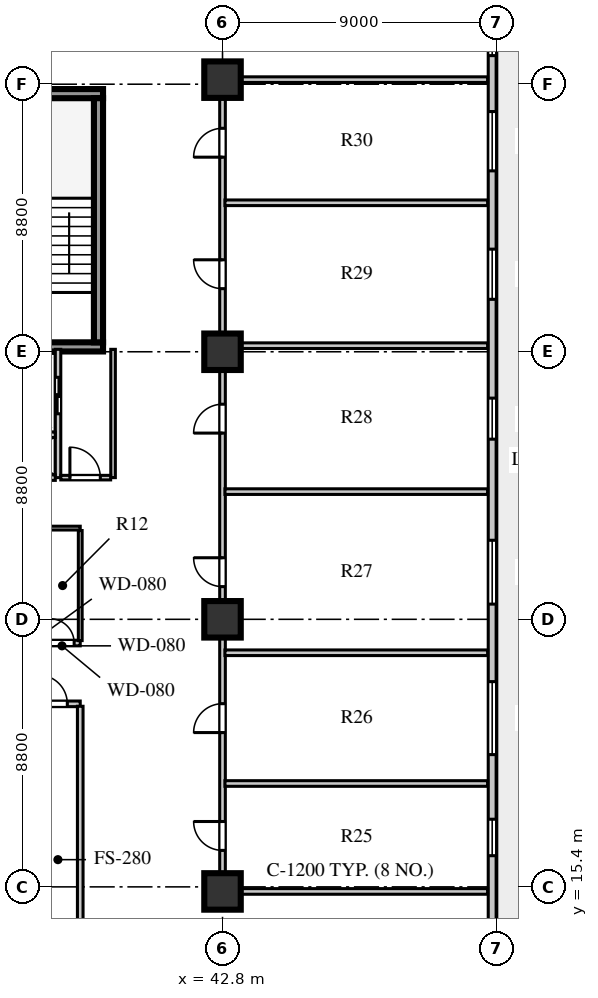
"""IFC4 building model, lengths in metres.
Left out: names, types, materials, properties, quantities, classifications, styles, units other than length and angle.
Written with IfcOpenShell. Run it as: python <this file> out.ifc"""

import sys

from ifc_helpers import new_model, si_unit, direction, frame, frame_2d, origin, origin_2d, place, context, subcontext, project, spatial, rectangle, extrude, element, fill, save


model = new_model("IFC4")
c1 = context("Model", 3, precision=1e-05, world=origin(), true_north=direction((0.0, 1.0)))
c2 = subcontext(c1, "Body", "Model", "MODEL_VIEW")
j1 = project(units=[si_unit("LENGTHUNIT", "METRE"), si_unit("PLANEANGLEUNIT", "RADIAN")], contexts=[c1])
p1 = place(None, origin())
s1 = spatial("IfcSite", under=j1, at=p1, CompositionType="ELEMENT")
p2 = place(p1, origin())
s2 = spatial("IfcBuilding", under=s1, at=p2, CompositionType="ELEMENT")
p3 = place(p2, frame((0.0, 0.0, 74.0)))
s3 = spatial("IfcBuildingStorey", under=s2, at=p3, CompositionType="ELEMENT", Elevation=74.0)
for number, where, z_axis, x_axis in (
    (1, (34.4, 33.16, 0.0), (0.0, 0.0, 1.0), (1.0, 0.0, 0.0)),
    (2, (34.4, 41.49, 0.0), (0.0, 0.0, 1.0), (1.0, 0.0, 0.0)),
):
    element("IfcWall", number, at=place(p3, frame(where, z_axis=z_axis, x_axis=x_axis)), inside=s3, PredefinedType="SHEAR", context=c2, shape_type="SweptSolid", body=[
        extrude(rectangle(XDim=4.47, YDim=0.3, at=frame_2d((2.235, 0.0))), origin(), (0.0, 0.0, 1.0), 3.72),
    ])
p4 = place(p3, frame((38.72, 33.31, 0.0), z_axis=(0.0, 0.0, 1.0), x_axis=(0.0, 1.0, 0.0)))
e3 = element("IfcWall", 3, at=p4, inside=s3, PredefinedType="SHEAR", context=c2, shape_type="SweptSolid", body=[
    extrude(rectangle(XDim=8.03, YDim=0.3, at=frame_2d((4.015, 0.0))), origin(), (0.0, 0.0, 1.0), 3.72),
])
for number, where, z_axis, x_axis in (
    (4, (42.8, 15.25, 0.0), (0.0, 0.0, 1.0), (1.0, 0.0, 0.0)),
    (5, (42.8, 24.2, 0.0), (0.0, 0.0, 1.0), (1.0, 0.0, 0.0)),
    (6, (42.8, 33.0, 0.0), (0.0, 0.0, 1.0), (1.0, 0.0, 0.0)),
    (7, (42.8, 41.95, 0.0), (0.0, 0.0, 1.0), (1.0, 0.0, 0.0)),
):
    element("IfcColumn", number, at=place(p3, frame(where, z_axis=z_axis, x_axis=x_axis)), inside=s3, PredefinedType="COLUMN", context=c2, shape_type="SweptSolid", body=[
        extrude(rectangle(XDim=1.2, YDim=1.2, at=origin_2d()), origin(), (0.0, 0.0, 1.0), 3.72),
    ])
p5 = place(p3, frame((51.67, 12.36, 0.0), z_axis=(0.0, 0.0, 1.0), x_axis=(0.0, 1.0, 0.0)))
e8 = element("IfcWall", 8, at=p5, inside=s3, PredefinedType="SOLIDWALL", context=c2, shape_type="SweptSolid", body=[
    extrude(rectangle(XDim=32.48, YDim=0.26, at=frame_2d((16.24, 0.0))), origin(), (0.0, 0.0, 1.0), 3.72),
])
p6 = place(p5, frame((0.69, 0.0, 0.0)))
e9 = element("IfcOpeningElement", 9, at=p6, cuts=e8, PredefinedType="OPENING", context=c2, shape_type="SweptSolid", body=[
    extrude(rectangle(XDim=1.0, YDim=2.05, at=frame_2d((0.5, 1.025))), frame((0.0, 0.14, 0.0), z_axis=(0.0, -1.0, 0.0), x_axis=(1.0, 0.0, 0.0)), (0.0, 0.0, 1.0), 0.28),
])
p7 = place(p5, frame((4.065, 0.0, 0.8)))
e10 = element("IfcOpeningElement", 10, at=p7, cuts=e8, PredefinedType="OPENING", context=c2, shape_type="SweptSolid", body=[
    extrude(rectangle(XDim=1.2, YDim=1.75, at=frame_2d((0.6, 0.875))), frame((0.0, 0.14, 0.0), z_axis=(0.0, -1.0, 0.0), x_axis=(1.0, 0.0, 0.0)), (0.0, 0.0, 1.0), 0.28),
])
p8 = place(p5, frame((7.39, 0.0, 0.8)))
e11 = element("IfcOpeningElement", 11, at=p8, cuts=e8, PredefinedType="OPENING", context=c2, shape_type="SweptSolid", body=[
    extrude(rectangle(XDim=2.4, YDim=2.05, at=frame_2d((1.2, 1.025))), frame((0.0, 0.14, 0.0), z_axis=(0.0, -1.0, 0.0), x_axis=(1.0, 0.0, 0.0)), (0.0, 0.0, 1.0), 0.28),
])
p9 = place(p5, frame((12.34, 0.0, 0.8)))
e12 = element("IfcOpeningElement", 12, at=p9, cuts=e8, PredefinedType="OPENING", context=c2, shape_type="SweptSolid", body=[
    extrude(rectangle(XDim=2.1, YDim=1.95, at=frame_2d((1.05, 0.975))), frame((0.0, 0.14, 0.0), z_axis=(0.0, -1.0, 0.0), x_axis=(1.0, 0.0, 0.0)), (0.0, 0.0, 1.0), 0.28),
])
p10 = place(p5, frame((17.765, 0.0, 0.8)))
e13 = element("IfcOpeningElement", 13, at=p10, cuts=e8, PredefinedType="OPENING", context=c2, shape_type="SweptSolid", body=[
    extrude(rectangle(XDim=1.35, YDim=1.9, at=frame_2d((0.675, 0.95))), frame((0.0, 0.14, 0.0), z_axis=(0.0, -1.0, 0.0), x_axis=(1.0, 0.0, 0.0)), (0.0, 0.0, 1.0), 0.28),
])
p11 = place(p5, frame((22.365, 0.0, 0.8)))
e14 = element("IfcOpeningElement", 14, at=p11, cuts=e8, PredefinedType="OPENING", context=c2, shape_type="SweptSolid", body=[
    extrude(rectangle(XDim=1.65, YDim=1.95, at=frame_2d((0.825, 0.975))), frame((0.0, 0.14, 0.0), z_axis=(0.0, -1.0, 0.0), x_axis=(1.0, 0.0, 0.0)), (0.0, 0.0, 1.0), 0.28),
])
p12 = place(p5, frame((26.59, 0.0, 0.8)))
e15 = element("IfcOpeningElement", 15, at=p12, cuts=e8, PredefinedType="OPENING", context=c2, shape_type="SweptSolid", body=[
    extrude(rectangle(XDim=1.95, YDim=2.0, at=frame_2d((0.975, 1.0))), frame((0.0, 0.14, 0.0), z_axis=(0.0, -1.0, 0.0), x_axis=(1.0, 0.0, 0.0)), (0.0, 0.0, 1.0), 0.28),
])
p13 = place(p5, frame((30.38, 0.0, 0.8)))
e16 = element("IfcOpeningElement", 16, at=p13, cuts=e8, PredefinedType="OPENING", context=c2, shape_type="SweptSolid", body=[
    extrude(rectangle(XDim=1.2, YDim=1.75, at=frame_2d((0.6, 0.875))), frame((0.0, 0.14, 0.0), z_axis=(0.0, -1.0, 0.0), x_axis=(1.0, 0.0, 0.0)), (0.0, 0.0, 1.0), 0.28),
])
p14 = place(p3, frame((37.39, 28.86, 0.0), z_axis=(0.0, 0.0, 1.0), x_axis=(0.0, 1.0, 0.0)))
e17 = element("IfcWall", 17, at=p14, inside=s3, PredefinedType="SOLIDWALL", context=c2, shape_type="SweptSolid", body=[
    extrude(rectangle(XDim=4.22, YDim=0.18, at=frame_2d((2.11, 0.0))), origin(), (0.0, 0.0, 1.0), 3.72),
])
p15 = place(p14, frame((2.1, 0.0, 0.0)))
e18 = element("IfcOpeningElement", 18, at=p15, cuts=e17, PredefinedType="OPENING", context=c2, shape_type="SweptSolid", body=[
    extrude(rectangle(XDim=1.2, YDim=2.12, at=frame_2d((0.6, 1.06))), frame((0.0, 0.1, 0.0), z_axis=(0.0, -1.0, 0.0), x_axis=(1.0, 0.0, 0.0)), (0.0, 0.0, 1.0), 0.2),
])
for number, where, z_axis, x_axis in (
    (19, (35.05, 28.86, 0.0), (0.0, 0.0, 1.0), (1.0, 0.0, 0.0)),
    (20, (35.05, 30.27, 0.0), (0.0, 0.0, 1.0), (1.0, 0.0, 0.0)),
):
    element("IfcWall", number, at=place(p3, frame(where, z_axis=z_axis, x_axis=x_axis)), inside=s3, PredefinedType="SOLIDWALL", context=c2, shape_type="SweptSolid", body=[
        extrude(rectangle(XDim=2.25, YDim=0.18, at=frame_2d((1.125, 0.0))), origin(), (0.0, 0.0, 1.0), 3.72),
    ])
p16 = place(p3, frame((39.2, 28.86, 0.0), z_axis=(0.0, 0.0, 1.0), x_axis=(0.0, 1.0, 0.0)))
e21 = element("IfcWall", 21, at=p16, inside=s3, PredefinedType="PARTITIONING", context=c2, shape_type="SweptSolid", body=[
    extrude(rectangle(XDim=4.22, YDim=0.15, at=frame_2d((2.11, 0.0))), origin(), (0.0, 0.0, 1.0), 3.72),
])
p17 = place(p3, frame((37.48, 28.86, 0.0), z_axis=(0.0, 0.0, 1.0), x_axis=(1.0, 0.0, 0.0)))
e22 = element("IfcWall", 22, at=p17, inside=s3, PredefinedType="PARTITIONING", context=c2, shape_type="SweptSolid", body=[
    extrude(rectangle(XDim=1.64, YDim=0.15, at=frame_2d((0.82, 0.0))), origin(), (0.0, 0.0, 1.0), 3.72),
])
p18 = place(p17, frame((0.3, 0.0, 0.0)))
e23 = element("IfcOpeningElement", 23, at=p18, cuts=e22, PredefinedType="OPENING", context=c2, shape_type="SweptSolid", body=[
    extrude(rectangle(XDim=1.0, YDim=2.1, at=frame_2d((0.5, 1.05))), frame((0.0, 0.085, 0.0), z_axis=(0.0, -1.0, 0.0), x_axis=(1.0, 0.0, 0.0)), (0.0, 0.0, 1.0), 0.17),
])
p19 = place(p3, frame((25.25, 21.42, 0.0), z_axis=(0.0, 0.0, 1.0), x_axis=(1.0, 0.0, 0.0)))
e24 = element("IfcWall", 24, at=p19, inside=s3, PredefinedType="SOLIDWALL", context=c2, shape_type="SweptSolid", body=[
    extrude(rectangle(XDim=12.87, YDim=0.185, at=frame_2d((6.435, 0.0))), origin(), (0.0, 0.0, 1.0), 3.32),
])
p20 = place(p19, frame((0.725, 0.0, 0.0)))
e25 = element("IfcOpeningElement", 25, at=p20, cuts=e24, PredefinedType="OPENING", context=c2, shape_type="SweptSolid", body=[
    extrude(rectangle(XDim=0.95, YDim=2.08, at=frame_2d((0.475, 1.04))), frame((0.0, 0.103, 0.0), z_axis=(0.0, -1.0, 0.0), x_axis=(1.0, 0.0, 0.0)), (0.0, 0.0, 1.0), 0.205),
])
p21 = place(p19, frame((3.025, 0.0, 0.0)))
e26 = element("IfcOpeningElement", 26, at=p21, cuts=e24, PredefinedType="OPENING", context=c2, shape_type="SweptSolid", body=[
    extrude(rectangle(XDim=0.95, YDim=2.08, at=frame_2d((0.475, 1.04))), frame((0.0, 0.103, 0.0), z_axis=(0.0, -1.0, 0.0), x_axis=(1.0, 0.0, 0.0)), (0.0, 0.0, 1.0), 0.205),
])
p22 = place(p19, frame((5.325, 0.0, 0.0)))
e27 = element("IfcOpeningElement", 27, at=p22, cuts=e24, PredefinedType="OPENING", context=c2, shape_type="SweptSolid", body=[
    extrude(rectangle(XDim=0.95, YDim=2.08, at=frame_2d((0.475, 1.04))), frame((0.0, 0.103, 0.0), z_axis=(0.0, -1.0, 0.0), x_axis=(1.0, 0.0, 0.0)), (0.0, 0.0, 1.0), 0.205),
])
p23 = place(p19, frame((7.625, 0.0, 0.0)))
e28 = element("IfcOpeningElement", 28, at=p23, cuts=e24, PredefinedType="OPENING", context=c2, shape_type="SweptSolid", body=[
    extrude(rectangle(XDim=0.95, YDim=2.08, at=frame_2d((0.475, 1.04))), frame((0.0, 0.103, 0.0), z_axis=(0.0, -1.0, 0.0), x_axis=(1.0, 0.0, 0.0)), (0.0, 0.0, 1.0), 0.205),
])
p24 = place(p19, frame((9.725, 0.0, 0.0)))
e29 = element("IfcOpeningElement", 29, at=p24, cuts=e24, PredefinedType="OPENING", context=c2, shape_type="SweptSolid", body=[
    extrude(rectangle(XDim=0.95, YDim=2.08, at=frame_2d((0.475, 1.04))), frame((0.0, 0.103, 0.0), z_axis=(0.0, -1.0, 0.0), x_axis=(1.0, 0.0, 0.0)), (0.0, 0.0, 1.0), 0.205),
])
p25 = place(p19, frame((11.495, 0.0, 0.0)))
e30 = element("IfcOpeningElement", 30, at=p25, cuts=e24, PredefinedType="OPENING", context=c2, shape_type="SweptSolid", body=[
    extrude(rectangle(XDim=0.95, YDim=2.08, at=frame_2d((0.475, 1.04))), frame((0.0, 0.103, 0.0), z_axis=(0.0, -1.0, 0.0), x_axis=(1.0, 0.0, 0.0)), (0.0, 0.0, 1.0), 0.205),
])
p26 = place(p3, frame((38.12, 6.88, 0.0), z_axis=(0.0, 0.0, 1.0), x_axis=(0.0, 1.0, 0.0)))
e31 = element("IfcWall", 31, at=p26, inside=s3, PredefinedType="SOLIDWALL", context=c2, shape_type="SweptSolid", body=[
    extrude(rectangle(XDim=14.46, YDim=0.185, at=frame_2d((7.23, 0.0))), origin(), (0.0, 0.0, 1.0), 3.72),
])
p27 = place(p3, frame((34.6, 23.42, 0.0), z_axis=(0.0, 0.0, 1.0), x_axis=(1.0, 0.0, 0.0)))
e32 = element("IfcWall", 32, at=p27, inside=s3, PredefinedType="SOLIDWALL", context=c2, shape_type="SweptSolid", body=[
    extrude(rectangle(XDim=3.52, YDim=0.185, at=frame_2d((1.76, 0.0))), origin(), (0.0, 0.0, 1.0), 3.72),
])
p28 = place(p27, frame((0.22, 0.0, 0.0)))
e33 = element("IfcOpeningElement", 33, at=p28, cuts=e32, PredefinedType="OPENING", context=c2, shape_type="SweptSolid", body=[
    extrude(rectangle(XDim=0.8, YDim=2.05, at=frame_2d((0.4, 1.025))), frame((0.0, 0.103, 0.0), z_axis=(0.0, -1.0, 0.0), x_axis=(1.0, 0.0, 0.0)), (0.0, 0.0, 1.0), 0.205),
])
p29 = place(p27, frame((1.38, 0.0, 0.0)))
e34 = element("IfcOpeningElement", 34, at=p29, cuts=e32, PredefinedType="OPENING", context=c2, shape_type="SweptSolid", body=[
    extrude(rectangle(XDim=0.8, YDim=2.05, at=frame_2d((0.4, 1.025))), frame((0.0, 0.103, 0.0), z_axis=(0.0, -1.0, 0.0), x_axis=(1.0, 0.0, 0.0)), (0.0, 0.0, 1.0), 0.205),
])
p30 = place(p27, frame((2.52, 0.0, 0.0)))
e35 = element("IfcOpeningElement", 35, at=p30, cuts=e32, PredefinedType="OPENING", context=c2, shape_type="SweptSolid", body=[
    extrude(rectangle(XDim=0.8, YDim=2.05, at=frame_2d((0.4, 1.025))), frame((0.0, 0.103, 0.0), z_axis=(0.0, -1.0, 0.0), x_axis=(1.0, 0.0, 0.0)), (0.0, 0.0, 1.0), 0.205),
])
p31 = place(p3, frame((42.8, 15.25, 0.0), z_axis=(0.0, 0.0, 1.0), x_axis=(0.0, 1.0, 0.0)))
e36 = element("IfcWall", 36, at=p31, inside=s3, PredefinedType="SOLIDWALL", context=c2, shape_type="SweptSolid", body=[
    extrude(rectangle(XDim=26.7, YDim=0.185, at=frame_2d((13.35, 0.0))), origin(), (0.0, 0.0, 1.0), 3.02),
])
p32 = place(p31, frame((1.35, 0.0, 0.0)))
e37 = element("IfcOpeningElement", 37, at=p32, cuts=e36, PredefinedType="OPENING", context=c2, shape_type="SweptSolid", body=[
    extrude(rectangle(XDim=0.95, YDim=2.08, at=frame_2d((0.475, 1.04))), frame((0.0, 0.103, 0.0), z_axis=(0.0, -1.0, 0.0), x_axis=(1.0, 0.0, 0.0)), (0.0, 0.0, 1.0), 0.205),
])
p33 = place(p31, frame((5.225, 0.0, 0.0)))
e38 = element("IfcOpeningElement", 38, at=p33, cuts=e36, PredefinedType="OPENING", context=c2, shape_type="SweptSolid", body=[
    extrude(rectangle(XDim=0.95, YDim=2.08, at=frame_2d((0.475, 1.04))), frame((0.0, 0.103, 0.0), z_axis=(0.0, -1.0, 0.0), x_axis=(1.0, 0.0, 0.0)), (0.0, 0.0, 1.0), 0.205),
])
p34 = place(p31, frame((10.025, 0.0, 0.0)))
e39 = element("IfcOpeningElement", 39, at=p34, cuts=e36, PredefinedType="OPENING", context=c2, shape_type="SweptSolid", body=[
    extrude(rectangle(XDim=0.95, YDim=2.08, at=frame_2d((0.475, 1.04))), frame((0.0, 0.103, 0.0), z_axis=(0.0, -1.0, 0.0), x_axis=(1.0, 0.0, 0.0)), (0.0, 0.0, 1.0), 0.205),
])
p35 = place(p31, frame((15.075, 0.0, 0.0)))
e40 = element("IfcOpeningElement", 40, at=p35, cuts=e36, PredefinedType="OPENING", context=c2, shape_type="SweptSolid", body=[
    extrude(rectangle(XDim=0.95, YDim=2.08, at=frame_2d((0.475, 1.04))), frame((0.0, 0.103, 0.0), z_axis=(0.0, -1.0, 0.0), x_axis=(1.0, 0.0, 0.0)), (0.0, 0.0, 1.0), 0.205),
])
p36 = place(p31, frame((19.825, 0.0, 0.0)))
e41 = element("IfcOpeningElement", 41, at=p36, cuts=e36, PredefinedType="OPENING", context=c2, shape_type="SweptSolid", body=[
    extrude(rectangle(XDim=0.95, YDim=2.08, at=frame_2d((0.475, 1.04))), frame((0.0, 0.103, 0.0), z_axis=(0.0, -1.0, 0.0), x_axis=(1.0, 0.0, 0.0)), (0.0, 0.0, 1.0), 0.205),
])
p37 = place(p31, frame((24.15, 0.0, 0.0)))
e42 = element("IfcOpeningElement", 42, at=p37, cuts=e36, PredefinedType="OPENING", context=c2, shape_type="SweptSolid", body=[
    extrude(rectangle(XDim=0.95, YDim=2.08, at=frame_2d((0.475, 1.04))), frame((0.0, 0.103, 0.0), z_axis=(0.0, -1.0, 0.0), x_axis=(1.0, 0.0, 0.0)), (0.0, 0.0, 1.0), 0.205),
])
for number, where, z_axis, x_axis in (
    (43, (42.88, 15.25, 0.0), (0.0, 0.0, 1.0), (1.0, 0.0, 0.0)),
    (44, (42.88, 41.95, 0.0), (0.0, 0.0, 1.0), (1.0, 0.0, 0.0)),
):
    element("IfcWall", number, at=place(p3, frame(where, z_axis=z_axis, x_axis=x_axis)), inside=s3, PredefinedType="SOLIDWALL", context=c2, shape_type="SweptSolid", body=[
        extrude(rectangle(XDim=8.64, YDim=0.185, at=frame_2d((4.32, 0.0))), origin(), (0.0, 0.0, 1.0), 3.22),
    ])
p38 = place(p3, frame((34.6, 27.2, 0.0), z_axis=(0.0, 0.0, 1.0), x_axis=(1.0, 0.0, 0.0)))
e45 = element("IfcWall", 45, at=p38, inside=s3, PredefinedType="PLUMBINGWALL", context=c2, shape_type="SweptSolid", body=[
    extrude(rectangle(XDim=3.52, YDim=0.125, at=frame_2d((1.76, 0.0))), origin(), (0.0, 0.0, 1.0), 3.32),
])
p39 = place(p3, frame((38.12, 23.5, 0.0), z_axis=(0.0, 0.0, 1.0), x_axis=(0.0, 1.0, 0.0)))
e46 = element("IfcWall", 46, at=p39, inside=s3, PredefinedType="PLUMBINGWALL", context=c2, shape_type="SweptSolid", body=[
    extrude(rectangle(XDim=3.62, YDim=0.125, at=frame_2d((1.81, 0.0))), origin(), (0.0, 0.0, 1.0), 3.72),
])
for number, where, z_axis, x_axis in (
    (47, (42.88, 18.8, 0.0), (0.0, 0.0, 1.0), (1.0, 0.0, 0.0)),
    (48, (42.88, 23.1, 0.0), (0.0, 0.0, 1.0), (1.0, 0.0, 0.0)),
    (49, (42.88, 28.4, 0.0), (0.0, 0.0, 1.0), (1.0, 0.0, 0.0)),
):
    element("IfcWall", number, at=place(p3, frame(where, z_axis=z_axis, x_axis=x_axis)), inside=s3, PredefinedType="SOLIDWALL", context=c2, shape_type="SweptSolid", body=[
        extrude(rectangle(XDim=8.64, YDim=0.185, at=frame_2d((4.32, 0.0))), origin(), (0.0, 0.0, 1.0), 3.72),
    ])
p40 = place(p3, frame((42.88, 33.2, 0.0), z_axis=(0.0, 0.0, 1.0), x_axis=(1.0, 0.0, 0.0)))
e50 = element("IfcWall", 50, at=p40, inside=s3, PredefinedType="SOLIDWALL", context=c2, shape_type="SweptSolid", body=[
    extrude(rectangle(XDim=8.64, YDim=0.185, at=frame_2d((4.32, 0.0))), origin(), (0.0, 0.0, 1.0), 3.22),
])
p41 = place(p3, frame((42.88, 37.9, 0.0), z_axis=(0.0, 0.0, 1.0), x_axis=(1.0, 0.0, 0.0)))
e51 = element("IfcWall", 51, at=p41, inside=s3, PredefinedType="SOLIDWALL", context=c2, shape_type="SweptSolid", body=[
    extrude(rectangle(XDim=8.64, YDim=0.185, at=frame_2d((4.32, 0.0))), origin(), (0.0, 0.0, 1.0), 3.72),
])
p42 = place(p7, origin())
e52 = element("IfcWindow", 52, at=p42, inside=s3, PartitioningType="SINGLE_PANEL", PredefinedType="WINDOW", context=c2, shape_type="SweptSolid", body=[
    extrude(rectangle(XDim=1.2, YDim=1.75, at=frame_2d((0.6, 0.875))), frame((0.0, 0.03, 0.0), z_axis=(0.0, -1.0, 0.0), x_axis=(1.0, 0.0, 0.0)), (0.0, 0.0, 1.0), 0.06),
])
fill(e10, e52)
p43 = place(p8, origin())
e53 = element("IfcWindow", 53, at=p43, inside=s3, PartitioningType="SINGLE_PANEL", PredefinedType="WINDOW", context=c2, shape_type="SweptSolid", body=[
    extrude(rectangle(XDim=2.4, YDim=2.05, at=frame_2d((1.2, 1.025))), frame((0.0, 0.03, 0.0), z_axis=(0.0, -1.0, 0.0), x_axis=(1.0, 0.0, 0.0)), (0.0, 0.0, 1.0), 0.06),
])
fill(e11, e53)
p44 = place(p9, origin())
e54 = element("IfcWindow", 54, at=p44, inside=s3, PartitioningType="SINGLE_PANEL", PredefinedType="WINDOW", context=c2, shape_type="SweptSolid", body=[
    extrude(rectangle(XDim=2.1, YDim=1.95, at=frame_2d((1.05, 0.975))), frame((0.0, 0.03, 0.0), z_axis=(0.0, -1.0, 0.0), x_axis=(1.0, 0.0, 0.0)), (0.0, 0.0, 1.0), 0.06),
])
fill(e12, e54)
p45 = place(p10, origin())
e55 = element("IfcWindow", 55, at=p45, inside=s3, PartitioningType="SINGLE_PANEL", PredefinedType="WINDOW", context=c2, shape_type="SweptSolid", body=[
    extrude(rectangle(XDim=1.35, YDim=1.9, at=frame_2d((0.675, 0.95))), frame((0.0, 0.03, 0.0), z_axis=(0.0, -1.0, 0.0), x_axis=(1.0, 0.0, 0.0)), (0.0, 0.0, 1.0), 0.06),
])
fill(e13, e55)
p46 = place(p11, origin())
e56 = element("IfcWindow", 56, at=p46, inside=s3, PartitioningType="SINGLE_PANEL", PredefinedType="WINDOW", context=c2, shape_type="SweptSolid", body=[
    extrude(rectangle(XDim=1.65, YDim=1.95, at=frame_2d((0.825, 0.975))), frame((0.0, 0.03, 0.0), z_axis=(0.0, -1.0, 0.0), x_axis=(1.0, 0.0, 0.0)), (0.0, 0.0, 1.0), 0.06),
])
fill(e14, e56)
p47 = place(p12, origin())
e57 = element("IfcWindow", 57, at=p47, inside=s3, PartitioningType="SINGLE_PANEL", PredefinedType="WINDOW", context=c2, shape_type="SweptSolid", body=[
    extrude(rectangle(XDim=1.95, YDim=2.0, at=frame_2d((0.975, 1.0))), frame((0.0, 0.03, 0.0), z_axis=(0.0, -1.0, 0.0), x_axis=(1.0, 0.0, 0.0)), (0.0, 0.0, 1.0), 0.06),
])
fill(e15, e57)
p48 = place(p13, origin())
e58 = element("IfcWindow", 58, at=p48, inside=s3, PartitioningType="SINGLE_PANEL", PredefinedType="WINDOW", context=c2, shape_type="SweptSolid", body=[
    extrude(rectangle(XDim=1.2, YDim=1.75, at=frame_2d((0.6, 0.875))), frame((0.0, 0.03, 0.0), z_axis=(0.0, -1.0, 0.0), x_axis=(1.0, 0.0, 0.0)), (0.0, 0.0, 1.0), 0.06),
])
fill(e16, e58)
p49 = place(p15, frame((1.2, 0.0, 0.0), z_axis=(0.0, 0.0, 1.0), x_axis=(-1.0, 0.0, 0.0)))
e59 = element("IfcDoor", 59, at=p49, inside=s3, OperationType="DOUBLE_DOOR_SLIDING", PredefinedType="DOOR", context=c2, shape_type="SweptSolid", body=[
    extrude(rectangle(XDim=1.2, YDim=2.12, at=frame_2d((0.6, 1.06))), frame((0.0, 0.025, 0.0), z_axis=(0.0, -1.0, 0.0), x_axis=(1.0, 0.0, 0.0)), (0.0, 0.0, 1.0), 0.05),
])
fill(e18, e59)
p50 = place(p18, origin())
e60 = element("IfcDoor", 60, at=p50, inside=s3, OperationType="SINGLE_SWING_LEFT", PredefinedType="DOOR", context=c2, shape_type="SweptSolid", body=[
    extrude(rectangle(XDim=1.0, YDim=2.1, at=frame_2d((0.5, 1.05))), frame((0.0, 0.025, 0.0), z_axis=(0.0, -1.0, 0.0), x_axis=(1.0, 0.0, 0.0)), (0.0, 0.0, 1.0), 0.05),
])
fill(e23, e60)
p51 = place(p30, origin())
e61 = element("IfcDoor", 61, at=p51, inside=s3, OperationType="SINGLE_SWING_LEFT", PredefinedType="DOOR", context=c2, shape_type="SweptSolid", body=[
    extrude(rectangle(XDim=0.8, YDim=2.05, at=frame_2d((0.4, 1.025))), frame((0.0, 0.025, 0.0), z_axis=(0.0, -1.0, 0.0), x_axis=(1.0, 0.0, 0.0)), (0.0, 0.0, 1.0), 0.05),
])
fill(e35, e61)
p52 = place(p25, frame((0.95, 0.0, 0.0), z_axis=(0.0, 0.0, 1.0), x_axis=(-1.0, 0.0, 0.0)))
e62 = element("IfcDoor", 62, at=p52, inside=s3, OperationType="SINGLE_SWING_RIGHT", PredefinedType="DOOR", context=c2, shape_type="SweptSolid", body=[
    extrude(rectangle(XDim=0.95, YDim=2.08, at=frame_2d((0.475, 1.04))), frame((0.0, 0.025, 0.0), z_axis=(0.0, -1.0, 0.0), x_axis=(1.0, 0.0, 0.0)), (0.0, 0.0, 1.0), 0.05),
])
fill(e30, e62)
p53 = place(p32, origin())
e63 = element("IfcDoor", 63, at=p53, inside=s3, OperationType="SINGLE_SWING_RIGHT", PredefinedType="DOOR", context=c2, shape_type="SweptSolid", body=[
    extrude(rectangle(XDim=0.95, YDim=2.08, at=frame_2d((0.475, 1.04))), frame((0.0, 0.025, 0.0), z_axis=(0.0, -1.0, 0.0), x_axis=(1.0, 0.0, 0.0)), (0.0, 0.0, 1.0), 0.05),
])
fill(e37, e63)
p54 = place(p33, origin())
e64 = element("IfcDoor", 64, at=p54, inside=s3, OperationType="SINGLE_SWING_LEFT", PredefinedType="DOOR", context=c2, shape_type="SweptSolid", body=[
    extrude(rectangle(XDim=0.95, YDim=2.08, at=frame_2d((0.475, 1.04))), frame((0.0, 0.025, 0.0), z_axis=(0.0, -1.0, 0.0), x_axis=(1.0, 0.0, 0.0)), (0.0, 0.0, 1.0), 0.05),
])
fill(e38, e64)
p55 = place(p34, origin())
e65 = element("IfcDoor", 65, at=p55, inside=s3, OperationType="SINGLE_SWING_RIGHT", PredefinedType="DOOR", context=c2, shape_type="SweptSolid", body=[
    extrude(rectangle(XDim=0.95, YDim=2.08, at=frame_2d((0.475, 1.04))), frame((0.0, 0.025, 0.0), z_axis=(0.0, -1.0, 0.0), x_axis=(1.0, 0.0, 0.0)), (0.0, 0.0, 1.0), 0.05),
])
fill(e39, e65)
p56 = place(p35, origin())
e66 = element("IfcDoor", 66, at=p56, inside=s3, OperationType="SINGLE_SWING_LEFT", PredefinedType="DOOR", context=c2, shape_type="SweptSolid", body=[
    extrude(rectangle(XDim=0.95, YDim=2.08, at=frame_2d((0.475, 1.04))), frame((0.0, 0.025, 0.0), z_axis=(0.0, -1.0, 0.0), x_axis=(1.0, 0.0, 0.0)), (0.0, 0.0, 1.0), 0.05),
])
fill(e40, e66)
p57 = place(p36, origin())
e67 = element("IfcDoor", 67, at=p57, inside=s3, OperationType="SINGLE_SWING_RIGHT", PredefinedType="DOOR", context=c2, shape_type="SweptSolid", body=[
    extrude(rectangle(XDim=0.95, YDim=2.08, at=frame_2d((0.475, 1.04))), frame((0.0, 0.025, 0.0), z_axis=(0.0, -1.0, 0.0), x_axis=(1.0, 0.0, 0.0)), (0.0, 0.0, 1.0), 0.05),
])
fill(e41, e67)
p58 = place(p37, origin())
e68 = element("IfcDoor", 68, at=p58, inside=s3, OperationType="SINGLE_SWING_LEFT", PredefinedType="DOOR", context=c2, shape_type="SweptSolid", body=[
    extrude(rectangle(XDim=0.95, YDim=2.08, at=frame_2d((0.475, 1.04))), frame((0.0, 0.025, 0.0), z_axis=(0.0, -1.0, 0.0), x_axis=(1.0, 0.0, 0.0)), (0.0, 0.0, 1.0), 0.05),
])
fill(e42, e68)
save(model, sys.argv[1])
